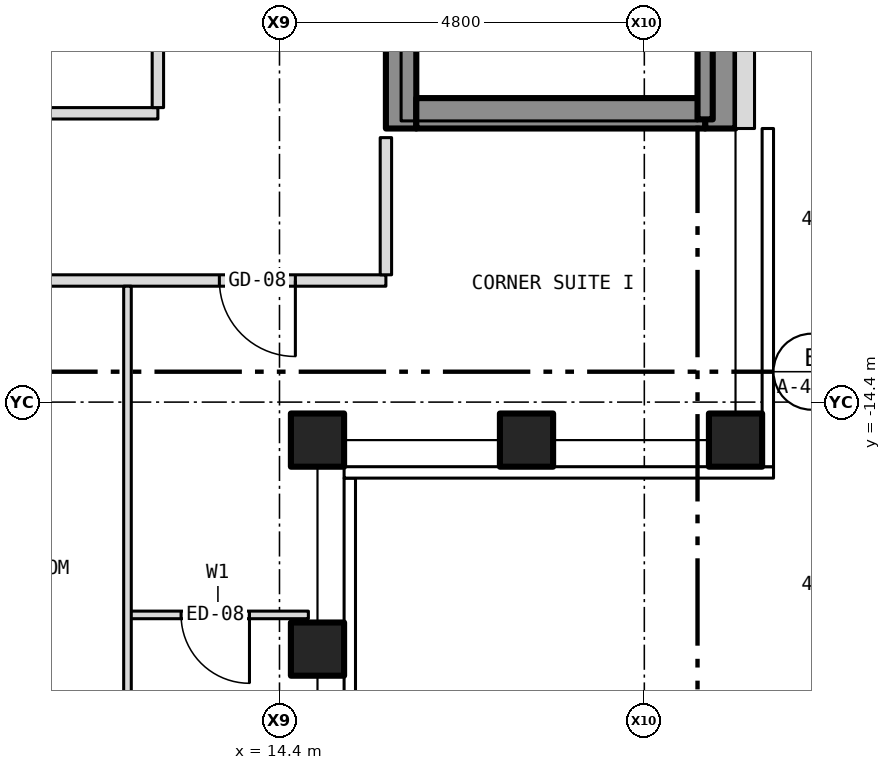
"""IFC4 building model, lengths in metres.
Left out: names, types, materials, properties, quantities, classifications, styles, units other than length and angle.
Written with IfcOpenShell. Run it as: python <this file> out.ifc"""

import sys

from ifc_helpers import new_model, si_unit, direction, frame, frame_2d, origin, origin_2d, place, context, subcontext, project, spatial, rectangle, hollow_rectangle, extrude, element, fill, save


model = new_model("IFC4")
c1 = context("Model", 3, precision=1e-05, world=origin(), true_north=direction((0.0, 1.0)))
c2 = subcontext(c1, "Body", "Model", "MODEL_VIEW")
j1 = project(units=[si_unit("LENGTHUNIT", "METRE"), si_unit("PLANEANGLEUNIT", "RADIAN")], contexts=[c1])
p1 = place(None, origin())
s1 = spatial("IfcSite", under=j1, at=p1, CompositionType="ELEMENT")
p2 = place(p1, origin())
s2 = spatial("IfcBuilding", under=s1, at=p2, CompositionType="ELEMENT")
p3 = place(p2, frame((0.0, 0.0, 194.5)))
s3 = spatial("IfcBuildingStorey", under=s2, at=p3, CompositionType="ELEMENT", Elevation=194.5)
for number, where, z_axis, x_axis in (
    (1, (20.4, -14.9, -0.15), (0.0, 0.0, 1.0), (1.0, 0.0, 0.0)),
    (2, (14.9, -14.9, -0.15), (0.0, 0.0, 1.0), (1.0, 0.0, 0.0)),
    (3, (14.9, -17.65, -0.15), (0.0, 0.0, 1.0), (1.0, 0.0, 0.0)),
    (4, (17.65, -14.9, -0.15), (0.0, 0.0, 1.0), (1.0, 0.0, 0.0)),
):
    element("IfcColumn", number, at=place(p3, frame(where, z_axis=z_axis, x_axis=x_axis)), inside=s3, PredefinedType="COLUMN", context=c2, shape_type="SweptSolid", body=[
        extrude(hollow_rectangle(XDim=0.7, YDim=0.7, WallThickness=0.04, at=origin_2d()), origin(), (0.0, 0.0, 1.0), 3.5),
    ])
p4 = place(p3, frame((16.0, -10.8, 0.0), z_axis=(0.0, 0.0, 1.0), x_axis=(0.0, 1.0, 0.0)))
e5 = element("IfcWall", 5, at=p4, inside=s3, PredefinedType="SHEAR", context=c2, shape_type="SweptSolid", body=[
    extrude(rectangle(XDim=21.6, YDim=0.4, at=frame_2d((10.8, 0.0))), origin(), (0.0, 0.0, 1.0), 3.25),
])
p5 = place(p4, frame((9.4, 0.0, 0.0)))
e6 = element("IfcOpeningElement", 6, at=p5, cuts=e5, PredefinedType="OPENING", context=c2, shape_type="SweptSolid", body=[
    extrude(rectangle(XDim=1.1, YDim=2.1, at=frame_2d((0.55, 1.05))), frame((0.0, 0.212, 0.0), z_axis=(0.0, -1.0, 0.0), x_axis=(1.0, 0.0, 0.0)), (0.0, 0.0, 1.0), 0.424),
])
p6 = place(p4, frame((11.5, 0.0, 0.0)))
e7 = element("IfcOpeningElement", 7, at=p6, cuts=e5, PredefinedType="OPENING", context=c2, shape_type="SweptSolid", body=[
    extrude(rectangle(XDim=1.1, YDim=2.1, at=frame_2d((0.55, 1.05))), frame((0.0, 0.212, 0.0), z_axis=(0.0, -1.0, 0.0), x_axis=(1.0, 0.0, 0.0)), (0.0, 0.0, 1.0), 0.424),
])
p7 = place(p4, frame((13.6, 0.0, 0.0)))
e8 = element("IfcOpeningElement", 8, at=p7, cuts=e5, PredefinedType="OPENING", context=c2, shape_type="SweptSolid", body=[
    extrude(rectangle(XDim=1.1, YDim=2.1, at=frame_2d((0.55, 1.05))), frame((0.0, 0.212, 0.0), z_axis=(0.0, -1.0, 0.0), x_axis=(1.0, 0.0, 0.0)), (0.0, 0.0, 1.0), 0.424),
])
p8 = place(p4, frame((15.7, 0.0, 0.0)))
e9 = element("IfcOpeningElement", 9, at=p8, cuts=e5, PredefinedType="OPENING", context=c2, shape_type="SweptSolid", body=[
    extrude(rectangle(XDim=1.1, YDim=2.1, at=frame_2d((0.55, 1.05))), frame((0.0, 0.212, 0.0), z_axis=(0.0, -1.0, 0.0), x_axis=(1.0, 0.0, 0.0)), (0.0, 0.0, 1.0), 0.424),
])
p9 = place(p4, frame((17.8, 0.0, 0.0)))
e10 = element("IfcOpeningElement", 10, at=p9, cuts=e5, PredefinedType="OPENING", context=c2, shape_type="SweptSolid", body=[
    extrude(rectangle(XDim=1.1, YDim=2.1, at=frame_2d((0.55, 1.05))), frame((0.0, 0.212, 0.0), z_axis=(0.0, -1.0, 0.0), x_axis=(1.0, 0.0, 0.0)), (0.0, 0.0, 1.0), 0.424),
])
p10 = place(p4, frame((5.642, 0.0, 0.0)))
e11 = element("IfcOpeningElement", 11, at=p10, cuts=e5, PredefinedType="OPENING", context=c2, shape_type="SweptSolid", body=[
    extrude(rectangle(XDim=1.1, YDim=2.1, at=frame_2d((0.55, 1.05))), frame((0.0, 0.212, 0.0), z_axis=(0.0, -1.0, 0.0), x_axis=(1.0, 0.0, 0.0)), (0.0, 0.0, 1.0), 0.424),
])
p11 = place(p4, frame((7.5, 0.0, 0.0)))
e12 = element("IfcOpeningElement", 12, at=p11, cuts=e5, PredefinedType="OPENING", context=c2, shape_type="SweptSolid", body=[
    extrude(rectangle(XDim=1.1, YDim=2.1, at=frame_2d((0.55, 1.05))), frame((0.0, 0.212, 0.0), z_axis=(0.0, -1.0, 0.0), x_axis=(1.0, 0.0, 0.0)), (0.0, 0.0, 1.0), 0.424),
])
p12 = place(p4, frame((20.0, 0.0, 0.0)))
e13 = element("IfcOpeningElement", 13, at=p12, cuts=e5, PredefinedType="OPENING", context=c2, shape_type="SweptSolid", body=[
    extrude(rectangle(XDim=0.9, YDim=2.1, at=frame_2d((0.45, 1.05))), frame((0.0, 0.212, 0.0), z_axis=(0.0, -1.0, 0.0), x_axis=(1.0, 0.0, 0.0)), (0.0, 0.0, 1.0), 0.424),
])
p13 = place(p3, frame((20.2, -10.8, 0.0), z_axis=(0.0, 0.0, 1.0), x_axis=(0.0, 1.0, 0.0)))
e14 = element("IfcWall", 14, at=p13, inside=s3, PredefinedType="SHEAR", context=c2, shape_type="SweptSolid", body=[
    extrude(rectangle(XDim=21.6, YDim=0.4, at=frame_2d((10.8, 0.0))), origin(), (0.0, 0.0, 1.0), 3.25),
])
p14 = place(p3, frame((16.2, -10.6, 0.0), z_axis=(0.0, 0.0, 1.0), x_axis=(1.0, 0.0, 0.0)))
e15 = element("IfcWall", 15, at=p14, inside=s3, PredefinedType="SHEAR", context=c2, shape_type="SweptSolid", body=[
    extrude(rectangle(XDim=3.8, YDim=0.4, at=frame_2d((1.9, 0.0))), origin(), (0.0, 0.0, 1.0), 3.25),
])
p15 = place(p3, frame((20.525, -10.8, 0.0), z_axis=(0.0, 0.0, 1.0), x_axis=(0.0, 1.0, 0.0)))
e16 = element("IfcWall", 16, at=p15, inside=s3, PredefinedType="SOLIDWALL", context=c2, shape_type="SweptSolid", body=[
    extrude(rectangle(XDim=21.6, YDim=0.25, at=frame_2d((10.8, 0.0))), origin(), (0.0, 0.0, 1.0), 3.5),
])
p16 = place(p15, frame((2.95, 0.0, 1.0)))
e17 = element("IfcOpeningElement", 17, at=p16, cuts=e16, PredefinedType="OPENING", context=c2, shape_type="SweptSolid", body=[
    extrude(rectangle(XDim=0.6, YDim=1.5, at=frame_2d((0.3, 0.75))), frame((0.0, 0.137, 0.0), z_axis=(0.0, -1.0, 0.0), x_axis=(1.0, 0.0, 0.0)), (0.0, 0.0, 1.0), 0.274),
])
p17 = place(p3, frame((12.4, -17.2, 0.0), z_axis=(0.0, 0.0, 1.0), x_axis=(1.0, 0.0, 0.0)))
e18 = element("IfcWall", 18, at=p17, inside=s3, PredefinedType="PARTITIONING", context=c2, shape_type="SweptSolid", body=[
    extrude(rectangle(XDim=2.38, YDim=0.1, at=frame_2d((1.19, 0.0))), origin(), (0.0, 0.0, 1.0), 3.35),
])
p18 = place(p17, frame((0.705, 0.0, 0.0)))
e19 = element("IfcOpeningElement", 19, at=p18, cuts=e18, PredefinedType="OPENING", context=c2, shape_type="SweptSolid", body=[
    extrude(rectangle(XDim=0.9, YDim=2.1, at=frame_2d((0.45, 1.05))), frame((0.0, 0.062, 0.0), z_axis=(0.0, -1.0, 0.0), x_axis=(1.0, 0.0, 0.0)), (0.0, 0.0, 1.0), 0.124),
])
p19 = place(p3, frame((-15.8, -12.8, 0.0), z_axis=(0.0, 0.0, 1.0), x_axis=(1.0, 0.0, 0.0)))
e20 = element("IfcWall", 20, at=p19, inside=s3, PredefinedType="PARTITIONING", context=c2, shape_type="SweptSolid", body=[
    extrude(rectangle(XDim=31.6, YDim=0.15, at=frame_2d((15.8, 0.0))), origin(), (0.0, 0.0, 1.0), 3.35),
])
p20 = place(p19, frame((10.582, 0.0, 0.0)))
e21 = element("IfcOpeningElement", 21, at=p20, cuts=e20, PredefinedType="OPENING", context=c2, shape_type="SweptSolid", body=[
    extrude(rectangle(XDim=1.0, YDim=2.1, at=frame_2d((0.5, 1.05))), frame((0.0, 0.087, 0.0), z_axis=(0.0, -1.0, 0.0), x_axis=(1.0, 0.0, 0.0)), (0.0, 0.0, 1.0), 0.174),
])
p21 = place(p19, frame((15.35, 0.0, 0.0)))
e22 = element("IfcOpeningElement", 22, at=p21, cuts=e20, PredefinedType="OPENING", context=c2, shape_type="SweptSolid", body=[
    extrude(rectangle(XDim=0.9, YDim=2.1, at=frame_2d((0.45, 1.05))), frame((0.0, 0.087, 0.0), z_axis=(0.0, -1.0, 0.0), x_axis=(1.0, 0.0, 0.0)), (0.0, 0.0, 1.0), 0.174),
])
p22 = place(p19, frame((25.482, 0.0, 0.0)))
e23 = element("IfcOpeningElement", 23, at=p22, cuts=e20, PredefinedType="OPENING", context=c2, shape_type="SweptSolid", body=[
    extrude(rectangle(XDim=1.0, YDim=2.1, at=frame_2d((0.5, 1.05))), frame((0.0, 0.087, 0.0), z_axis=(0.0, -1.0, 0.0), x_axis=(1.0, 0.0, 0.0)), (0.0, 0.0, 1.0), 0.174),
])
p23 = place(p19, frame((1.192, 0.0, 0.0)))
e24 = element("IfcOpeningElement", 24, at=p23, cuts=e20, PredefinedType="OPENING", context=c2, shape_type="SweptSolid", body=[
    extrude(rectangle(XDim=1.0, YDim=2.1, at=frame_2d((0.5, 1.05))), frame((0.0, 0.087, 0.0), z_axis=(0.0, -1.0, 0.0), x_axis=(1.0, 0.0, 0.0)), (0.0, 0.0, 1.0), 0.174),
])
p24 = place(p19, frame((29.409, 0.0, 0.0)))
e25 = element("IfcOpeningElement", 25, at=p24, cuts=e20, PredefinedType="OPENING", context=c2, shape_type="SweptSolid", body=[
    extrude(rectangle(XDim=1.0, YDim=2.1, at=frame_2d((0.5, 1.05))), frame((0.0, 0.087, 0.0), z_axis=(0.0, -1.0, 0.0), x_axis=(1.0, 0.0, 0.0)), (0.0, 0.0, 1.0), 0.174),
])
p25 = place(p3, frame((9.7, -10.6, 0.0), z_axis=(0.0, 0.0, 1.0), x_axis=(1.0, 0.0, 0.0)))
e26 = element("IfcWall", 26, at=p25, inside=s3, PredefinedType="PARTITIONING", context=c2, shape_type="SweptSolid", body=[
    extrude(rectangle(XDim=3.1, YDim=0.15, at=frame_2d((1.55, 0.0))), origin(), (0.0, 0.0, 1.0), 3.35),
])
p26 = place(p3, frame((12.4, -20.78, 0.0), z_axis=(0.0, 0.0, 1.0), x_axis=(0.0, 1.0, 0.0)))
e27 = element("IfcWall", 27, at=p26, inside=s3, PredefinedType="PARTITIONING", context=c2, shape_type="SweptSolid", body=[
    extrude(rectangle(XDim=7.905, YDim=0.1, at=frame_2d((3.953, 0.0))), origin(), (0.0, 0.0, 1.0), 3.35),
])
p27 = place(p3, frame((12.8, -10.525, 0.0), z_axis=(0.0, 0.0, 1.0), x_axis=(0.0, 1.0, 0.0)))
e28 = element("IfcWall", 28, at=p27, inside=s3, PredefinedType="PARTITIONING", context=c2, shape_type="SweptSolid", body=[
    extrude(rectangle(XDim=8.525, YDim=0.15, at=frame_2d((4.262, 0.0))), origin(), (0.0, 0.0, 1.0), 3.35),
])
p28 = place(p3, frame((15.8, -12.725, 0.0), z_axis=(0.0, 0.0, 1.0), x_axis=(0.0, 1.0, 0.0)))
e29 = element("IfcWall", 29, at=p28, inside=s3, PredefinedType="PARTITIONING", context=c2, shape_type="SweptSolid", body=[
    extrude(rectangle(XDim=1.805, YDim=0.15, at=frame_2d((0.903, 0.0))), origin(), (0.0, 0.0, 1.0), 3.35),
])
p29 = place(p3, frame((20.0, -10.68, 0.0), z_axis=(0.0, 0.0, 1.0), x_axis=(0.0, 1.0, 0.0)))
e30 = element("IfcWall", 30, at=p29, inside=s3, PredefinedType="SHEAR", context=c2, shape_type="SweptSolid", body=[
    extrude(rectangle(XDim=6.98, YDim=0.2, at=frame_2d((3.49, 0.0))), origin(), (0.0, 0.0, 1.0), 3.25),
])
p30 = place(p18, origin())
e31 = element("IfcDoor", 31, at=p30, inside=s3, OperationType="SINGLE_SWING_RIGHT", PredefinedType="DOOR", context=c2, shape_type="SweptSolid", body=[
    extrude(rectangle(XDim=0.9, YDim=2.1, at=frame_2d((0.45, 1.05))), frame((0.0, 0.025, 0.0), z_axis=(0.0, -1.0, 0.0), x_axis=(1.0, 0.0, 0.0)), (0.0, 0.0, 1.0), 0.05),
])
fill(e19, e31)
p31 = place(p24, origin())
e32 = element("IfcDoor", 32, at=p31, inside=s3, OperationType="SINGLE_SWING_RIGHT", PredefinedType="DOOR", context=c2, shape_type="SweptSolid", body=[
    extrude(rectangle(XDim=1.0, YDim=2.1, at=frame_2d((0.5, 1.05))), frame((0.0, 0.025, 0.0), z_axis=(0.0, -1.0, 0.0), x_axis=(1.0, 0.0, 0.0)), (0.0, 0.0, 1.0), 0.05),
])
fill(e25, e32)
save(model, sys.argv[1])
